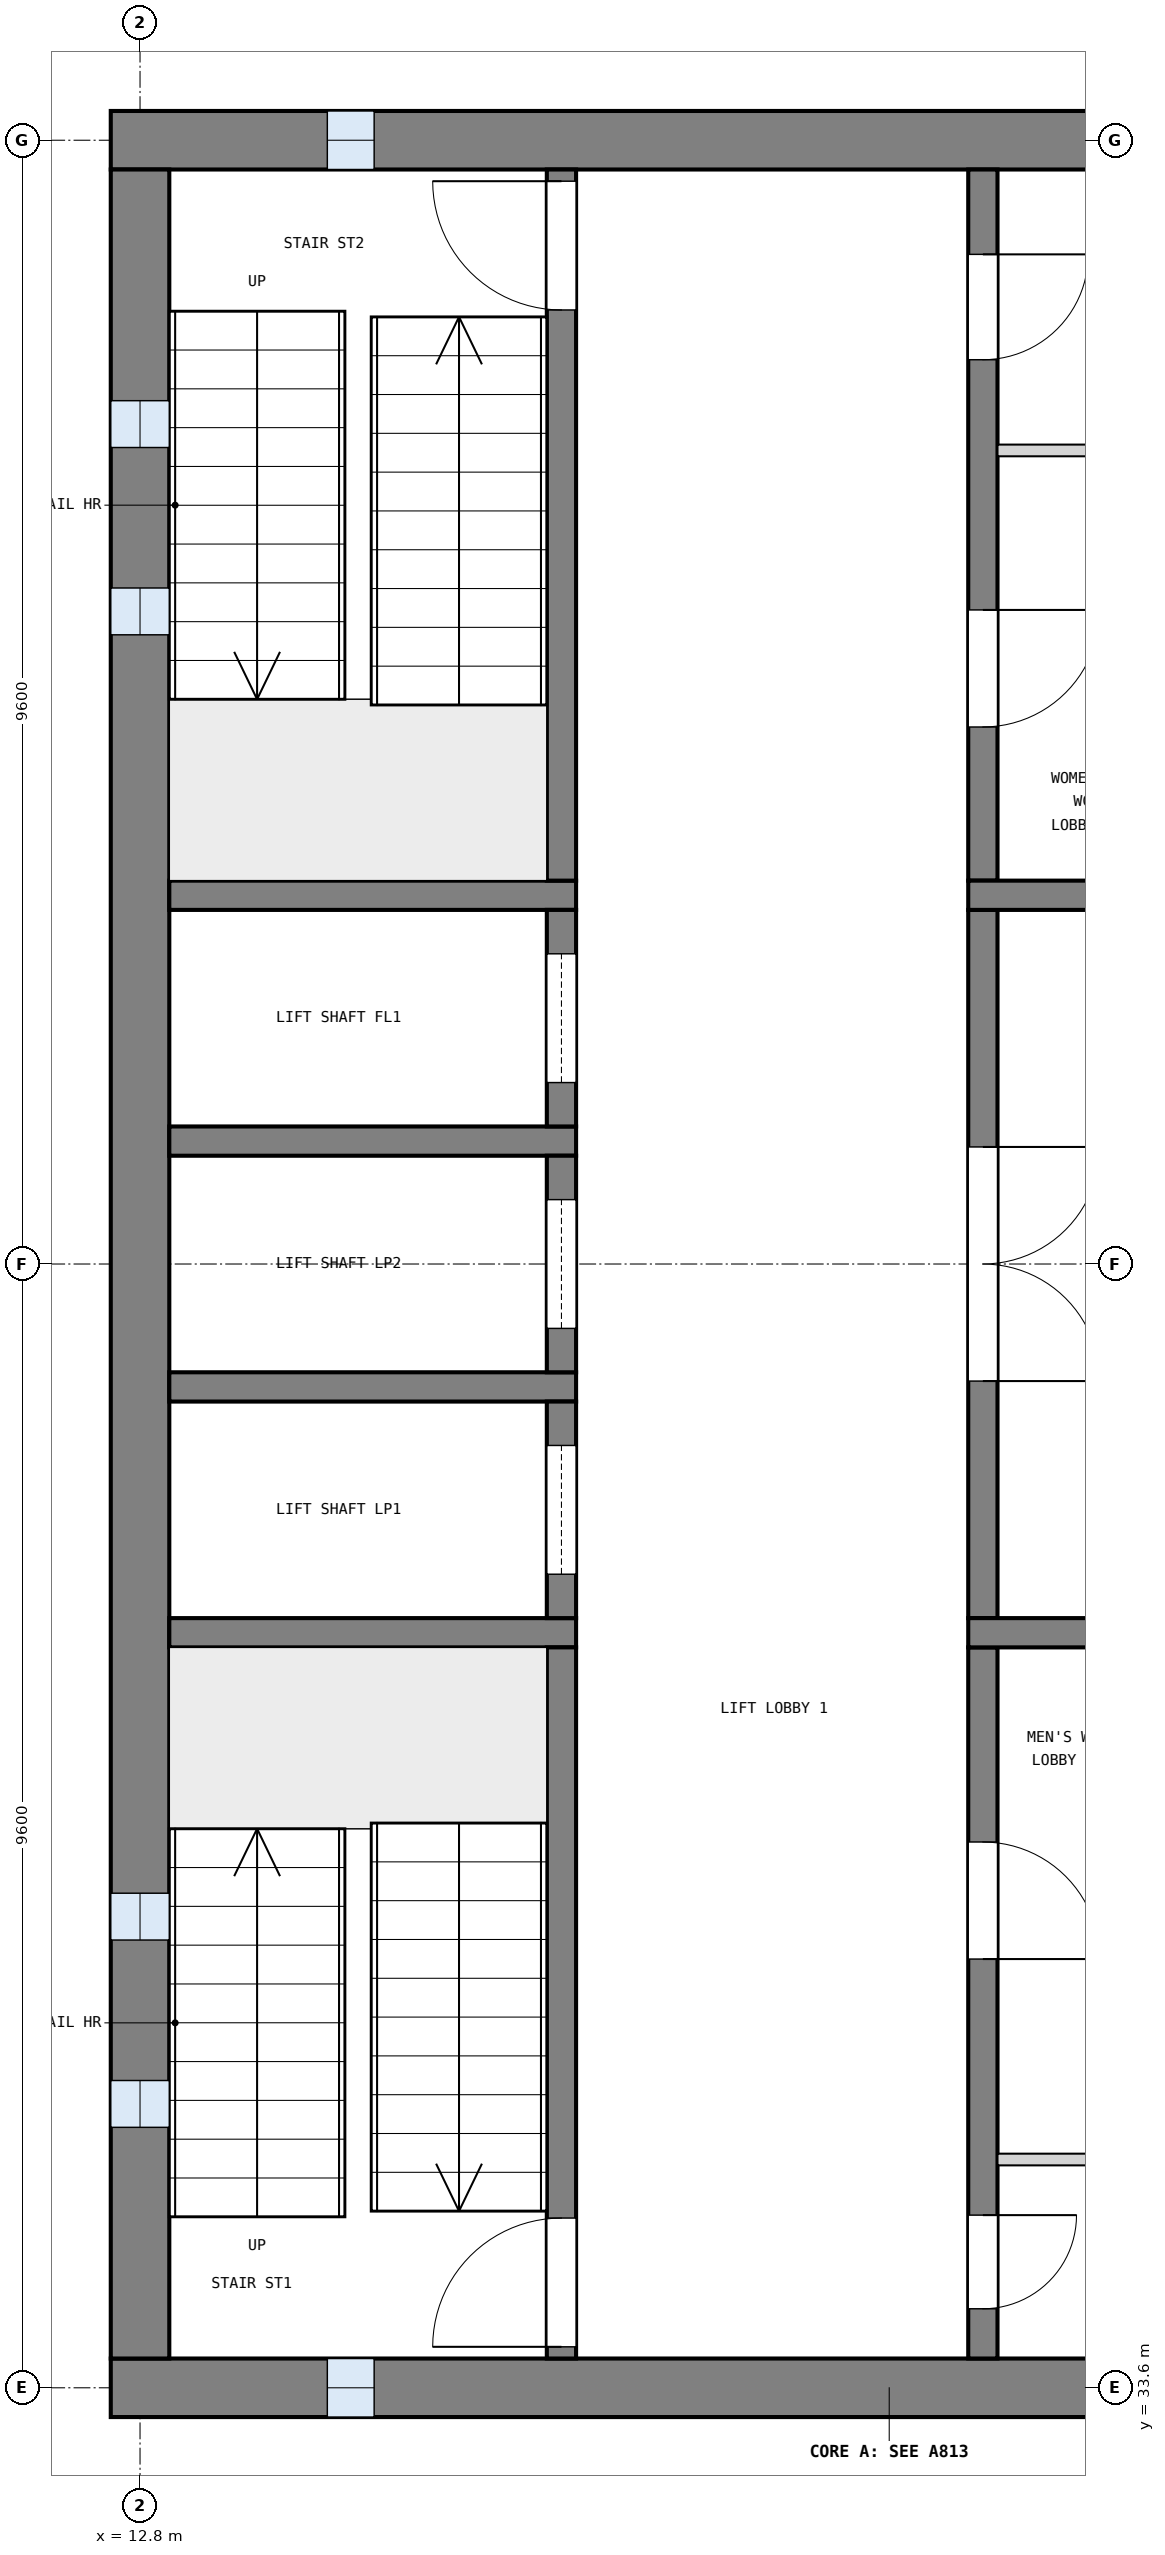
"""IFC4 building model, lengths in metres.
Left out: names, types, materials, properties, quantities, classifications, styles, units other than length and angle.
Written with IfcOpenShell. Run it as: python <this file> out.ifc"""

import sys

from ifc_helpers import new_model, si_unit, direction, frame, frame_2d, origin, place, context, subcontext, project, spatial, rectangle, extrude, element, fill, save


model = new_model("IFC4")
c1 = context("Model", 3, precision=1e-05, world=origin(), true_north=direction((0.0, 1.0)))
c2 = subcontext(c1, "Body", "Model", "MODEL_VIEW")
j1 = project(units=[si_unit("LENGTHUNIT", "METRE"), si_unit("PLANEANGLEUNIT", "RADIAN")], contexts=[c1])
p1 = place(None, origin())
s1 = spatial("IfcSite", under=j1, at=p1, CompositionType="ELEMENT")
p2 = place(p1, origin())
s2 = spatial("IfcBuilding", under=s1, at=p2, CompositionType="ELEMENT")
p3 = place(p2, frame((0.0, 0.0, 44.4)))
s3 = spatial("IfcBuildingStorey", under=s2, at=p3, CompositionType="ELEMENT", Elevation=44.4)
p4 = place(p3, frame((12.55, 52.8, 0.0), z_axis=(0.0, 0.0, 1.0), x_axis=(1.0, 0.0, 0.0)))
e1 = element("IfcWall", 1, at=p4, inside=s3, PredefinedType="SHEAR", context=c2, shape_type="SweptSolid", body=[
    extrude(rectangle(XDim=13.3, YDim=0.5, at=frame_2d((6.65, 0.0))), origin(), (0.0, 0.0, 1.0), 3.9),
])
p5 = place(p4, frame((1.85, 0.0, 1.0)))
e2 = element("IfcOpeningElement", 2, at=p5, cuts=e1, PredefinedType="OPENING", context=c2, shape_type="SweptSolid", body=[
    extrude(rectangle(XDim=0.4, YDim=2.0, at=frame_2d((0.2, 1.0))), frame((0.0, 0.26, 0.0), z_axis=(0.0, -1.0, 0.0), x_axis=(1.0, 0.0, 0.0)), (0.0, 0.0, 1.0), 0.52),
])
p6 = place(p3, frame((12.55, 33.6, 0.0), z_axis=(0.0, 0.0, 1.0), x_axis=(1.0, 0.0, 0.0)))
e3 = element("IfcWall", 3, at=p6, inside=s3, PredefinedType="SHEAR", context=c2, shape_type="SweptSolid", body=[
    extrude(rectangle(XDim=13.3, YDim=0.5, at=frame_2d((6.65, 0.0))), origin(), (0.0, 0.0, 1.0), 3.9),
])
p7 = place(p6, frame((1.85, 0.0, 1.0)))
e4 = element("IfcOpeningElement", 4, at=p7, cuts=e3, PredefinedType="OPENING", context=c2, shape_type="SweptSolid", body=[
    extrude(rectangle(XDim=0.4, YDim=2.0, at=frame_2d((0.2, 1.0))), frame((0.0, 0.26, 0.0), z_axis=(0.0, -1.0, 0.0), x_axis=(1.0, 0.0, 0.0)), (0.0, 0.0, 1.0), 0.52),
])
p8 = place(p3, frame((12.8, 33.85, 0.0), z_axis=(0.0, 0.0, 1.0), x_axis=(0.0, 1.0, 0.0)))
e5 = element("IfcWall", 5, at=p8, inside=s3, PredefinedType="SHEAR", context=c2, shape_type="SweptSolid", body=[
    extrude(rectangle(XDim=18.7, YDim=0.5, at=frame_2d((9.35, 0.0))), origin(), (0.0, 0.0, 1.0), 3.9),
])
p9 = place(p8, frame((1.975, 0.0, 1.0)))
e6 = element("IfcOpeningElement", 6, at=p9, cuts=e5, PredefinedType="OPENING", context=c2, shape_type="SweptSolid", body=[
    extrude(rectangle(XDim=0.4, YDim=2.0, at=frame_2d((0.2, 1.0))), frame((0.0, 0.26, 0.0), z_axis=(0.0, -1.0, 0.0), x_axis=(1.0, 0.0, 0.0)), (0.0, 0.0, 1.0), 0.52),
])
p10 = place(p8, frame((3.575, 0.0, 1.0)))
e7 = element("IfcOpeningElement", 7, at=p10, cuts=e5, PredefinedType="OPENING", context=c2, shape_type="SweptSolid", body=[
    extrude(rectangle(XDim=0.4, YDim=2.0, at=frame_2d((0.2, 1.0))), frame((0.0, 0.26, 0.0), z_axis=(0.0, -1.0, 0.0), x_axis=(1.0, 0.0, 0.0)), (0.0, 0.0, 1.0), 0.52),
])
p11 = place(p8, frame((14.725, 0.0, 1.0)))
e8 = element("IfcOpeningElement", 8, at=p11, cuts=e5, PredefinedType="OPENING", context=c2, shape_type="SweptSolid", body=[
    extrude(rectangle(XDim=0.4, YDim=2.0, at=frame_2d((0.2, 1.0))), frame((0.0, 0.26, 0.0), z_axis=(0.0, -1.0, 0.0), x_axis=(1.0, 0.0, 0.0)), (0.0, 0.0, 1.0), 0.52),
])
p12 = place(p8, frame((16.325, 0.0, 1.0)))
e9 = element("IfcOpeningElement", 9, at=p12, cuts=e5, PredefinedType="OPENING", context=c2, shape_type="SweptSolid", body=[
    extrude(rectangle(XDim=0.4, YDim=2.0, at=frame_2d((0.2, 1.0))), frame((0.0, 0.26, 0.0), z_axis=(0.0, -1.0, 0.0), x_axis=(1.0, 0.0, 0.0)), (0.0, 0.0, 1.0), 0.52),
])
for number, where, z_axis, x_axis in (
    (10, (13.05, 40.05, 0.0), (0.0, 0.0, 1.0), (1.0, 0.0, 0.0)),
    (11, (13.05, 42.15, 0.0), (0.0, 0.0, 1.0), (1.0, 0.0, 0.0)),
    (12, (13.05, 44.25, 0.0), (0.0, 0.0, 1.0), (1.0, 0.0, 0.0)),
    (13, (13.05, 46.35, 0.0), (0.0, 0.0, 1.0), (1.0, 0.0, 0.0)),
):
    element("IfcWall", number, at=place(p3, frame(where, z_axis=z_axis, x_axis=x_axis)), inside=s3, PredefinedType="SOLIDWALL", context=c2, shape_type="SweptSolid", body=[
        extrude(rectangle(XDim=3.475, YDim=0.25, at=frame_2d((1.737, 0.0))), origin(), (0.0, 0.0, 1.0), 3.6),
    ])
p13 = place(p3, frame((16.4, 33.85, 0.0), z_axis=(0.0, 0.0, 1.0), x_axis=(0.0, 1.0, 0.0)))
e14 = element("IfcWall", 14, at=p13, inside=s3, PredefinedType="SOLIDWALL", context=c2, shape_type="SweptSolid", body=[
    extrude(rectangle(XDim=6.075, YDim=0.25, at=frame_2d((3.038, 0.0))), origin(), (0.0, 0.0, 1.0), 3.6),
])
p14 = place(p13, frame((0.1, 0.0, 0.0)))
e15 = element("IfcOpeningElement", 15, at=p14, cuts=e14, PredefinedType="OPENING", context=c2, shape_type="SweptSolid", body=[
    extrude(rectangle(XDim=1.1, YDim=2.1, at=frame_2d((0.55, 1.05))), frame((0.0, 0.135, 0.0), z_axis=(0.0, -1.0, 0.0), x_axis=(1.0, 0.0, 0.0)), (0.0, 0.0, 1.0), 0.27),
])
p15 = place(p3, frame((16.4, 40.175, 0.0), z_axis=(0.0, 0.0, 1.0), x_axis=(0.0, 1.0, 0.0)))
e16 = element("IfcWall", 16, at=p15, inside=s3, PredefinedType="SOLIDWALL", context=c2, shape_type="SweptSolid", body=[
    extrude(rectangle(XDim=1.85, YDim=0.25, at=frame_2d((0.925, 0.0))), origin(), (0.0, 0.0, 1.0), 3.6),
])
p16 = place(p15, frame((0.375, 0.0, 0.0)))
e17 = element("IfcOpeningElement", 17, at=p16, cuts=e16, PredefinedType="OPENING", context=c2, shape_type="SweptSolid", body=[
    extrude(rectangle(XDim=1.1, YDim=2.1, at=frame_2d((0.55, 1.05))), frame((0.0, 0.135, 0.0), z_axis=(0.0, -1.0, 0.0), x_axis=(1.0, 0.0, 0.0)), (0.0, 0.0, 1.0), 0.27),
])
p17 = place(p3, frame((16.4, 42.275, 0.0), z_axis=(0.0, 0.0, 1.0), x_axis=(0.0, 1.0, 0.0)))
e18 = element("IfcWall", 18, at=p17, inside=s3, PredefinedType="SOLIDWALL", context=c2, shape_type="SweptSolid", body=[
    extrude(rectangle(XDim=1.85, YDim=0.25, at=frame_2d((0.925, 0.0))), origin(), (0.0, 0.0, 1.0), 3.6),
])
p18 = place(p17, frame((0.375, 0.0, 0.0)))
e19 = element("IfcOpeningElement", 19, at=p18, cuts=e18, PredefinedType="OPENING", context=c2, shape_type="SweptSolid", body=[
    extrude(rectangle(XDim=1.1, YDim=2.1, at=frame_2d((0.55, 1.05))), frame((0.0, 0.135, 0.0), z_axis=(0.0, -1.0, 0.0), x_axis=(1.0, 0.0, 0.0)), (0.0, 0.0, 1.0), 0.27),
])
p19 = place(p3, frame((16.4, 44.375, 0.0), z_axis=(0.0, 0.0, 1.0), x_axis=(0.0, 1.0, 0.0)))
e20 = element("IfcWall", 20, at=p19, inside=s3, PredefinedType="SOLIDWALL", context=c2, shape_type="SweptSolid", body=[
    extrude(rectangle(XDim=1.85, YDim=0.25, at=frame_2d((0.925, 0.0))), origin(), (0.0, 0.0, 1.0), 3.6),
])
p20 = place(p19, frame((0.375, 0.0, 0.0)))
e21 = element("IfcOpeningElement", 21, at=p20, cuts=e20, PredefinedType="OPENING", context=c2, shape_type="SweptSolid", body=[
    extrude(rectangle(XDim=1.1, YDim=2.1, at=frame_2d((0.55, 1.05))), frame((0.0, 0.135, 0.0), z_axis=(0.0, -1.0, 0.0), x_axis=(1.0, 0.0, 0.0)), (0.0, 0.0, 1.0), 0.27),
])
p21 = place(p3, frame((16.4, 46.475, 0.0), z_axis=(0.0, 0.0, 1.0), x_axis=(0.0, 1.0, 0.0)))
e22 = element("IfcWall", 22, at=p21, inside=s3, PredefinedType="SOLIDWALL", context=c2, shape_type="SweptSolid", body=[
    extrude(rectangle(XDim=6.075, YDim=0.25, at=frame_2d((3.038, 0.0))), origin(), (0.0, 0.0, 1.0), 3.6),
])
p22 = place(p21, frame((4.875, 0.0, 0.0)))
e23 = element("IfcOpeningElement", 23, at=p22, cuts=e22, PredefinedType="OPENING", context=c2, shape_type="SweptSolid", body=[
    extrude(rectangle(XDim=1.1, YDim=2.1, at=frame_2d((0.55, 1.05))), frame((0.0, 0.135, 0.0), z_axis=(0.0, -1.0, 0.0), x_axis=(1.0, 0.0, 0.0)), (0.0, 0.0, 1.0), 0.27),
])
p23 = place(p3, frame((20.0, 33.85, 0.0), z_axis=(0.0, 0.0, 1.0), x_axis=(0.0, 1.0, 0.0)))
e24 = element("IfcWall", 24, at=p23, inside=s3, PredefinedType="SOLIDWALL", context=c2, shape_type="SweptSolid", body=[
    extrude(rectangle(XDim=6.075, YDim=0.25, at=frame_2d((3.038, 0.0))), origin(), (0.0, 0.0, 1.0), 3.6),
])
p24 = place(p23, frame((0.425, 0.0, 0.0)))
e25 = element("IfcOpeningElement", 25, at=p24, cuts=e24, PredefinedType="OPENING", context=c2, shape_type="SweptSolid", body=[
    extrude(rectangle(XDim=0.8, YDim=2.1, at=frame_2d((0.4, 1.05))), frame((0.0, 0.135, 0.0), z_axis=(0.0, -1.0, 0.0), x_axis=(1.0, 0.0, 0.0)), (0.0, 0.0, 1.0), 0.27),
])
p25 = place(p23, frame((3.413, 0.0, 0.0)))
e26 = element("IfcOpeningElement", 26, at=p25, cuts=e24, PredefinedType="OPENING", context=c2, shape_type="SweptSolid", body=[
    extrude(rectangle(XDim=1.0, YDim=2.1, at=frame_2d((0.5, 1.05))), frame((0.0, 0.135, 0.0), z_axis=(0.0, -1.0, 0.0), x_axis=(1.0, 0.0, 0.0)), (0.0, 0.0, 1.0), 0.27),
])
p26 = place(p3, frame((20.0, 40.175, 0.0), z_axis=(0.0, 0.0, 1.0), x_axis=(0.0, 1.0, 0.0)))
e27 = element("IfcWall", 27, at=p26, inside=s3, PredefinedType="SOLIDWALL", context=c2, shape_type="SweptSolid", body=[
    extrude(rectangle(XDim=6.05, YDim=0.25, at=frame_2d((3.025, 0.0))), origin(), (0.0, 0.0, 1.0), 3.6),
])
p27 = place(p26, frame((2.025, 0.0, 0.0)))
e28 = element("IfcOpeningElement", 28, at=p27, cuts=e27, PredefinedType="OPENING", context=c2, shape_type="SweptSolid", body=[
    extrude(rectangle(XDim=2.0, YDim=2.1, at=frame_2d((1.0, 1.05))), frame((0.0, 0.135, 0.0), z_axis=(0.0, -1.0, 0.0), x_axis=(1.0, 0.0, 0.0)), (0.0, 0.0, 1.0), 0.27),
])
p28 = place(p3, frame((20.0, 46.475, 0.0), z_axis=(0.0, 0.0, 1.0), x_axis=(0.0, 1.0, 0.0)))
e29 = element("IfcWall", 29, at=p28, inside=s3, PredefinedType="SOLIDWALL", context=c2, shape_type="SweptSolid", body=[
    extrude(rectangle(XDim=6.075, YDim=0.25, at=frame_2d((3.038, 0.0))), origin(), (0.0, 0.0, 1.0), 3.6),
])
p29 = place(p28, frame((1.312, 0.0, 0.0)))
e30 = element("IfcOpeningElement", 30, at=p29, cuts=e29, PredefinedType="OPENING", context=c2, shape_type="SweptSolid", body=[
    extrude(rectangle(XDim=1.0, YDim=2.1, at=frame_2d((0.5, 1.05))), frame((0.0, 0.135, 0.0), z_axis=(0.0, -1.0, 0.0), x_axis=(1.0, 0.0, 0.0)), (0.0, 0.0, 1.0), 0.27),
])
p30 = place(p28, frame((4.45, 0.0, 0.0)))
e31 = element("IfcOpeningElement", 31, at=p30, cuts=e29, PredefinedType="OPENING", context=c2, shape_type="SweptSolid", body=[
    extrude(rectangle(XDim=0.9, YDim=2.1, at=frame_2d((0.45, 1.05))), frame((0.0, 0.135, 0.0), z_axis=(0.0, -1.0, 0.0), x_axis=(1.0, 0.0, 0.0)), (0.0, 0.0, 1.0), 0.27),
])
for number, where, z_axis, x_axis in (
    (32, (19.875, 40.05, 0.0), (0.0, 0.0, 1.0), (1.0, 0.0, 0.0)),
    (33, (19.875, 46.35, 0.0), (0.0, 0.0, 1.0), (1.0, 0.0, 0.0)),
):
    element("IfcWall", number, at=place(p3, frame(where, z_axis=z_axis, x_axis=x_axis)), inside=s3, PredefinedType="SOLIDWALL", context=c2, shape_type="SweptSolid", body=[
        extrude(rectangle(XDim=5.475, YDim=0.25, at=frame_2d((2.738, 0.0))), origin(), (0.0, 0.0, 1.0), 3.6),
    ])
for number, where, z_axis, x_axis in (
    (34, (20.125, 35.55, 0.0), (0.0, 0.0, 1.0), (1.0, 0.0, 0.0)),
    (35, (20.125, 50.15, 0.0), (0.0, 0.0, 1.0), (1.0, 0.0, 0.0)),
):
    element("IfcWall", number, at=place(p3, frame(where, z_axis=z_axis, x_axis=x_axis)), inside=s3, PredefinedType="PARTITIONING", context=c2, shape_type="SweptSolid", body=[
        extrude(rectangle(XDim=5.225, YDim=0.1, at=frame_2d((2.613, 0.0))), origin(), (0.0, 0.0, 1.0), 3.6),
    ])
p31 = place(p9, origin())
e36 = element("IfcWindow", 36, at=p31, inside=s3, PartitioningType="SINGLE_PANEL", PredefinedType="WINDOW", context=c2, shape_type="SweptSolid", body=[
    extrude(rectangle(XDim=0.4, YDim=2.0, at=frame_2d((0.2, 1.0))), frame((0.0, 0.03, 0.0), z_axis=(0.0, -1.0, 0.0), x_axis=(1.0, 0.0, 0.0)), (0.0, 0.0, 1.0), 0.06),
])
fill(e6, e36)
p32 = place(p10, origin())
e37 = element("IfcWindow", 37, at=p32, inside=s3, PartitioningType="SINGLE_PANEL", PredefinedType="WINDOW", context=c2, shape_type="SweptSolid", body=[
    extrude(rectangle(XDim=0.4, YDim=2.0, at=frame_2d((0.2, 1.0))), frame((0.0, 0.03, 0.0), z_axis=(0.0, -1.0, 0.0), x_axis=(1.0, 0.0, 0.0)), (0.0, 0.0, 1.0), 0.06),
])
fill(e7, e37)
p33 = place(p11, origin())
e38 = element("IfcWindow", 38, at=p33, inside=s3, PartitioningType="SINGLE_PANEL", PredefinedType="WINDOW", context=c2, shape_type="SweptSolid", body=[
    extrude(rectangle(XDim=0.4, YDim=2.0, at=frame_2d((0.2, 1.0))), frame((0.0, 0.03, 0.0), z_axis=(0.0, -1.0, 0.0), x_axis=(1.0, 0.0, 0.0)), (0.0, 0.0, 1.0), 0.06),
])
fill(e8, e38)
p34 = place(p12, origin())
e39 = element("IfcWindow", 39, at=p34, inside=s3, PartitioningType="SINGLE_PANEL", PredefinedType="WINDOW", context=c2, shape_type="SweptSolid", body=[
    extrude(rectangle(XDim=0.4, YDim=2.0, at=frame_2d((0.2, 1.0))), frame((0.0, 0.03, 0.0), z_axis=(0.0, -1.0, 0.0), x_axis=(1.0, 0.0, 0.0)), (0.0, 0.0, 1.0), 0.06),
])
fill(e9, e39)
p35 = place(p7, origin())
e40 = element("IfcWindow", 40, at=p35, inside=s3, PartitioningType="SINGLE_PANEL", PredefinedType="WINDOW", context=c2, shape_type="SweptSolid", body=[
    extrude(rectangle(XDim=0.4, YDim=2.0, at=frame_2d((0.2, 1.0))), frame((0.0, 0.03, 0.0), z_axis=(0.0, -1.0, 0.0), x_axis=(1.0, 0.0, 0.0)), (0.0, 0.0, 1.0), 0.06),
])
fill(e4, e40)
p36 = place(p5, origin())
e41 = element("IfcWindow", 41, at=p36, inside=s3, PartitioningType="SINGLE_PANEL", PredefinedType="WINDOW", context=c2, shape_type="SweptSolid", body=[
    extrude(rectangle(XDim=0.4, YDim=2.0, at=frame_2d((0.2, 1.0))), frame((0.0, 0.03, 0.0), z_axis=(0.0, -1.0, 0.0), x_axis=(1.0, 0.0, 0.0)), (0.0, 0.0, 1.0), 0.06),
])
fill(e2, e41)
p37 = place(p14, origin())
e42 = element("IfcDoor", 42, at=p37, inside=s3, OperationType="SINGLE_SWING_LEFT", PredefinedType="DOOR", context=c2, shape_type="SweptSolid", body=[
    extrude(rectangle(XDim=1.1, YDim=2.1, at=frame_2d((0.55, 1.05))), frame((0.0, 0.025, 0.0), z_axis=(0.0, -1.0, 0.0), x_axis=(1.0, 0.0, 0.0)), (0.0, 0.0, 1.0), 0.05),
])
fill(e15, e42)
p38 = place(p22, origin())
e43 = element("IfcDoor", 43, at=p38, inside=s3, OperationType="SINGLE_SWING_RIGHT", PredefinedType="DOOR", context=c2, shape_type="SweptSolid", body=[
    extrude(rectangle(XDim=1.1, YDim=2.1, at=frame_2d((0.55, 1.05))), frame((0.0, 0.025, 0.0), z_axis=(0.0, -1.0, 0.0), x_axis=(1.0, 0.0, 0.0)), (0.0, 0.0, 1.0), 0.05),
])
fill(e23, e43)
p39 = place(p16, origin())
e44 = element("IfcDoor", 44, at=p39, inside=s3, OperationType="SLIDING_TO_LEFT", PredefinedType="DOOR", context=c2, shape_type="SweptSolid", body=[
    extrude(rectangle(XDim=1.1, YDim=2.1, at=frame_2d((0.55, 1.05))), frame((0.0, 0.025, 0.0), z_axis=(0.0, -1.0, 0.0), x_axis=(1.0, 0.0, 0.0)), (0.0, 0.0, 1.0), 0.05),
])
fill(e17, e44)
p40 = place(p18, origin())
e45 = element("IfcDoor", 45, at=p40, inside=s3, OperationType="SLIDING_TO_LEFT", PredefinedType="DOOR", context=c2, shape_type="SweptSolid", body=[
    extrude(rectangle(XDim=1.1, YDim=2.1, at=frame_2d((0.55, 1.05))), frame((0.0, 0.025, 0.0), z_axis=(0.0, -1.0, 0.0), x_axis=(1.0, 0.0, 0.0)), (0.0, 0.0, 1.0), 0.05),
])
fill(e19, e45)
p41 = place(p20, origin())
e46 = element("IfcDoor", 46, at=p41, inside=s3, OperationType="SLIDING_TO_LEFT", PredefinedType="DOOR", context=c2, shape_type="SweptSolid", body=[
    extrude(rectangle(XDim=1.1, YDim=2.1, at=frame_2d((0.55, 1.05))), frame((0.0, 0.025, 0.0), z_axis=(0.0, -1.0, 0.0), x_axis=(1.0, 0.0, 0.0)), (0.0, 0.0, 1.0), 0.05),
])
fill(e21, e46)
p42 = place(p27, frame((2.0, 0.0, 0.0), z_axis=(0.0, 0.0, 1.0), x_axis=(-1.0, 0.0, 0.0)))
e47 = element("IfcDoor", 47, at=p42, inside=s3, OperationType="DOUBLE_DOOR_SINGLE_SWING", PredefinedType="DOOR", context=c2, shape_type="SweptSolid", body=[
    extrude(rectangle(XDim=2.0, YDim=2.1, at=frame_2d((1.0, 1.05))), frame((0.0, 0.025, 0.0), z_axis=(0.0, -1.0, 0.0), x_axis=(1.0, 0.0, 0.0)), (0.0, 0.0, 1.0), 0.05),
])
fill(e28, e47)
p43 = place(p24, frame((0.8, 0.0, 0.0), z_axis=(0.0, 0.0, 1.0), x_axis=(-1.0, 0.0, 0.0)))
e48 = element("IfcDoor", 48, at=p43, inside=s3, OperationType="SINGLE_SWING_LEFT", PredefinedType="DOOR", context=c2, shape_type="SweptSolid", body=[
    extrude(rectangle(XDim=0.8, YDim=2.1, at=frame_2d((0.4, 1.05))), frame((0.0, 0.025, 0.0), z_axis=(0.0, -1.0, 0.0), x_axis=(1.0, 0.0, 0.0)), (0.0, 0.0, 1.0), 0.05),
])
fill(e25, e48)
p44 = place(p25, frame((1.0, 0.0, 0.0), z_axis=(0.0, 0.0, 1.0), x_axis=(-1.0, 0.0, 0.0)))
e49 = element("IfcDoor", 49, at=p44, inside=s3, OperationType="SINGLE_SWING_RIGHT", PredefinedType="DOOR", context=c2, shape_type="SweptSolid", body=[
    extrude(rectangle(XDim=1.0, YDim=2.1, at=frame_2d((0.5, 1.05))), frame((0.0, 0.025, 0.0), z_axis=(0.0, -1.0, 0.0), x_axis=(1.0, 0.0, 0.0)), (0.0, 0.0, 1.0), 0.05),
])
fill(e26, e49)
p45 = place(p29, frame((1.0, 0.0, 0.0), z_axis=(0.0, 0.0, 1.0), x_axis=(-1.0, 0.0, 0.0)))
e50 = element("IfcDoor", 50, at=p45, inside=s3, OperationType="SINGLE_SWING_LEFT", PredefinedType="DOOR", context=c2, shape_type="SweptSolid", body=[
    extrude(rectangle(XDim=1.0, YDim=2.1, at=frame_2d((0.5, 1.05))), frame((0.0, 0.025, 0.0), z_axis=(0.0, -1.0, 0.0), x_axis=(1.0, 0.0, 0.0)), (0.0, 0.0, 1.0), 0.05),
])
fill(e30, e50)
p46 = place(p30, frame((0.9, 0.0, 0.0), z_axis=(0.0, 0.0, 1.0), x_axis=(-1.0, 0.0, 0.0)))
e51 = element("IfcDoor", 51, at=p46, inside=s3, OperationType="SINGLE_SWING_LEFT", PredefinedType="DOOR", context=c2, shape_type="SweptSolid", body=[
    extrude(rectangle(XDim=0.9, YDim=2.1, at=frame_2d((0.45, 1.05))), frame((0.0, 0.025, 0.0), z_axis=(0.0, -1.0, 0.0), x_axis=(1.0, 0.0, 0.0)), (0.0, 0.0, 1.0), 0.05),
])
fill(e31, e51)
save(model, sys.argv[1])
